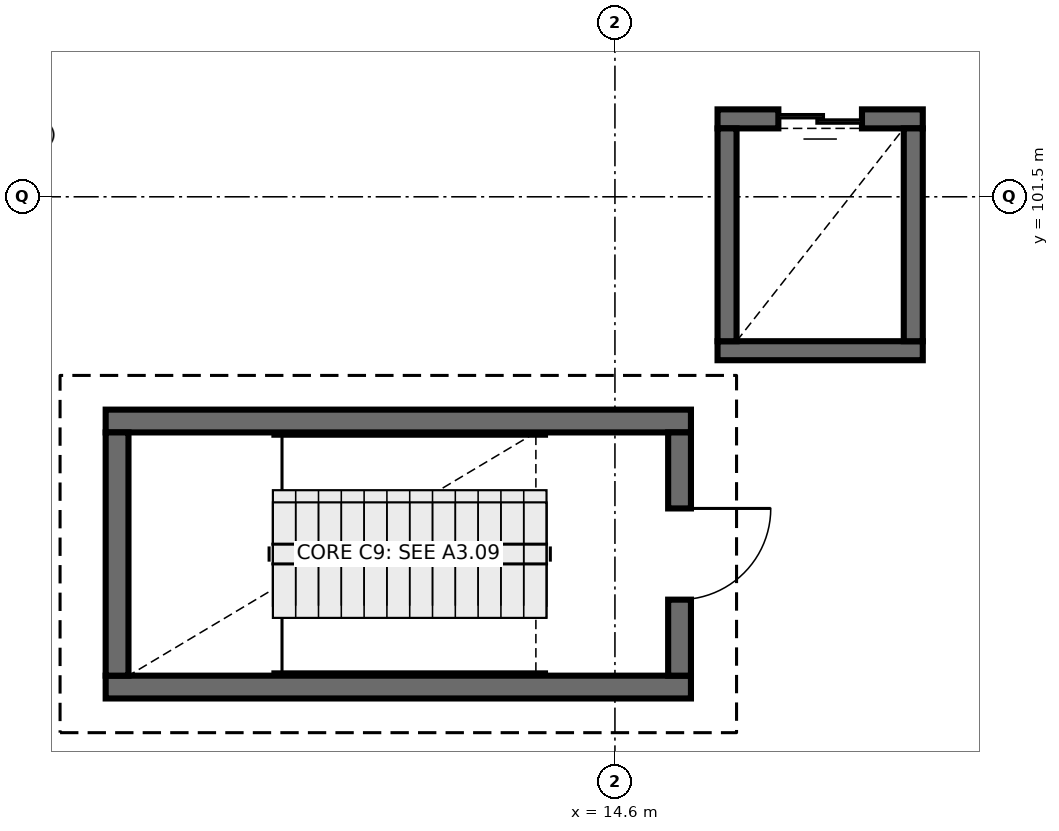
"""IFC4 building model, lengths in metres.
Left out: names, types, materials, properties, quantities, classifications, styles, units other than length and angle.
Written with IfcOpenShell. Run it as: python <this file> out.ifc"""

import sys

from ifc_helpers import new_model, si_unit, direction, frame, frame_2d, origin, place, context, subcontext, project, spatial, rectangle, extrude, element, fill, save


model = new_model("IFC4")
c1 = context("Model", 3, precision=1e-05, world=origin(), true_north=direction((0.0, 1.0)))
c2 = subcontext(c1, "Body", "Model", "MODEL_VIEW")
j1 = project(units=[si_unit("LENGTHUNIT", "METRE"), si_unit("PLANEANGLEUNIT", "RADIAN")], contexts=[c1])
p1 = place(None, origin())
s1 = spatial("IfcSite", under=j1, at=p1, CompositionType="ELEMENT")
p2 = place(p1, origin())
s2 = spatial("IfcBuilding", under=s1, at=p2, CompositionType="ELEMENT")
p3 = place(p2, origin())
s3 = spatial("IfcBuildingStorey", under=s2, at=p3, CompositionType="ELEMENT", Elevation=0.0)
for number, where, z_axis, x_axis in (
    (1, (7.9, 95.05, 0.0), (0.0, 0.0, 1.0), (1.0, 0.0, 0.0)),
    (2, (15.6, 98.55, 0.0), (0.0, 0.0, 1.0), (-1.0, 0.0, 0.0)),
):
    element("IfcWall", number, at=place(p3, frame(where, z_axis=z_axis, x_axis=x_axis)), inside=s3, PredefinedType="SHEAR", context=c2, shape_type="SweptSolid", body=[
        extrude(rectangle(XDim=7.7, YDim=0.3, at=frame_2d((3.85, 0.0))), origin(), (0.0, 0.0, 1.0), 4.8),
    ])
p4 = place(p3, frame((8.05, 98.4, 0.0), z_axis=(0.0, 0.0, 1.0), x_axis=(0.0, -1.0, 0.0)))
e3 = element("IfcWall", 3, at=p4, inside=s3, PredefinedType="SHEAR", context=c2, shape_type="SweptSolid", body=[
    extrude(rectangle(XDim=3.2, YDim=0.3, at=frame_2d((1.6, 0.0))), origin(), (0.0, 0.0, 1.0), 4.8),
])
p5 = place(p3, frame((15.45, 95.2, 0.0), z_axis=(0.0, 0.0, 1.0), x_axis=(0.0, 1.0, 0.0)))
e4 = element("IfcWall", 4, at=p5, inside=s3, PredefinedType="SHEAR", context=c2, shape_type="SweptSolid", body=[
    extrude(rectangle(XDim=3.2, YDim=0.3, at=frame_2d((1.6, 0.0))), origin(), (0.0, 0.0, 1.0), 4.8),
])
p6 = place(p5, frame((1.0, 0.0, 0.0)))
e5 = element("IfcOpeningElement", 5, at=p6, cuts=e4, PredefinedType="OPENING", context=c2, shape_type="SweptSolid", body=[
    extrude(rectangle(XDim=1.2, YDim=2.15, at=frame_2d((0.6, 1.075))), frame((0.0, 0.16, 0.0), z_axis=(0.0, -1.0, 0.0), x_axis=(1.0, 0.0, 0.0)), (0.0, 0.0, 1.0), 0.32),
])
p7 = place(p3, frame((15.95, 99.475, 0.0), z_axis=(0.0, 0.0, 1.0), x_axis=(1.0, 0.0, 0.0)))
e6 = element("IfcWall", 6, at=p7, inside=s3, PredefinedType="SHEAR", context=c2, shape_type="SweptSolid", body=[
    extrude(rectangle(XDim=2.7, YDim=0.25, at=frame_2d((1.35, 0.0))), origin(), (0.0, 0.0, 1.0), 4.8),
])
p8 = place(p3, frame((18.65, 102.525, 0.0), z_axis=(0.0, 0.0, 1.0), x_axis=(-1.0, 0.0, 0.0)))
e7 = element("IfcWall", 7, at=p8, inside=s3, PredefinedType="SHEAR", context=c2, shape_type="SweptSolid", body=[
    extrude(rectangle(XDim=2.7, YDim=0.25, at=frame_2d((1.35, 0.0))), origin(), (0.0, 0.0, 1.0), 4.8),
])
p9 = place(p8, frame((0.8, 0.0, 0.0)))
e8 = element("IfcOpeningElement", 8, at=p9, cuts=e7, PredefinedType="OPENING", context=c2, shape_type="SweptSolid", body=[
    extrude(rectangle(XDim=1.1, YDim=2.15, at=frame_2d((0.55, 1.075))), frame((0.0, 0.135, 0.0), z_axis=(0.0, -1.0, 0.0), x_axis=(1.0, 0.0, 0.0)), (0.0, 0.0, 1.0), 0.27),
])
for number, where, z_axis, x_axis in (
    (9, (16.075, 102.4, 0.0), (0.0, 0.0, 1.0), (0.0, -1.0, 0.0)),
    (10, (18.525, 99.6, 0.0), (0.0, 0.0, 1.0), (0.0, 1.0, 0.0)),
):
    element("IfcWall", number, at=place(p3, frame(where, z_axis=z_axis, x_axis=x_axis)), inside=s3, PredefinedType="SHEAR", context=c2, shape_type="SweptSolid", body=[
        extrude(rectangle(XDim=2.8, YDim=0.25, at=frame_2d((1.4, 0.0))), origin(), (0.0, 0.0, 1.0), 4.8),
    ])
p10 = place(p6, frame((1.2, 0.0, 0.0), z_axis=(0.0, 0.0, 1.0), x_axis=(-1.0, 0.0, 0.0)))
e11 = element("IfcDoor", 11, at=p10, inside=s3, OperationType="SINGLE_SWING_RIGHT", PredefinedType="DOOR", context=c2, shape_type="SweptSolid", body=[
    extrude(rectangle(XDim=1.2, YDim=2.15, at=frame_2d((0.6, 1.075))), frame((0.0, 0.025, 0.0), z_axis=(0.0, -1.0, 0.0), x_axis=(1.0, 0.0, 0.0)), (0.0, 0.0, 1.0), 0.05),
])
fill(e5, e11)
p11 = place(p9, origin())
e12 = element("IfcDoor", 12, at=p11, inside=s3, OperationType="DOUBLE_DOOR_SLIDING", PredefinedType="DOOR", context=c2, shape_type="SweptSolid", body=[
    extrude(rectangle(XDim=1.1, YDim=2.15, at=frame_2d((0.55, 1.075))), frame((0.0, 0.025, 0.0), z_axis=(0.0, -1.0, 0.0), x_axis=(1.0, 0.0, 0.0)), (0.0, 0.0, 1.0), 0.05),
])
fill(e8, e12)
save(model, sys.argv[1])
